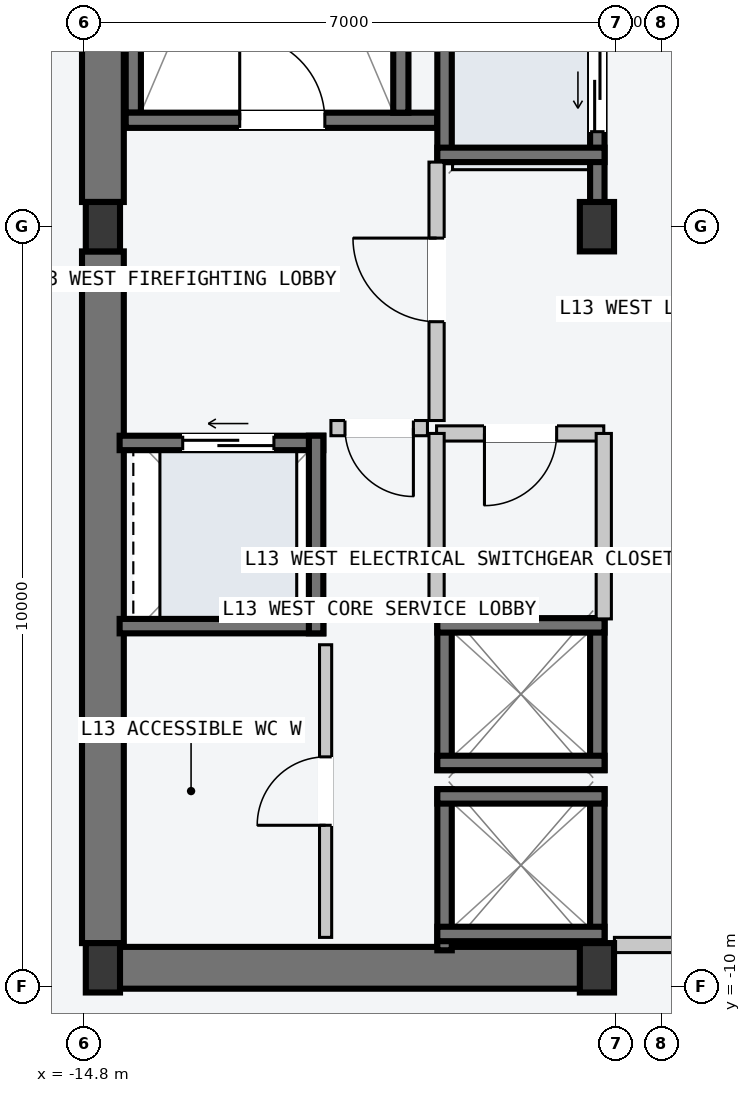
"""IFC4 building model, lengths in metres.
Left out: names, types, materials, properties, quantities, classifications, styles, units other than length and angle.
Written with IfcOpenShell. Run it as: python <this file> out.ifc"""

import sys

from ifc_helpers import new_model, si_unit, direction, frame, frame_2d, origin, origin_2d, place, context, subcontext, project, spatial, rectangle, i_section, extrude, element, fill, save


model = new_model("IFC4")
c1 = context("Model", 3, precision=1e-05, world=origin(), true_north=direction((0.0, 1.0)))
c2 = subcontext(c1, "Body", "Model", "MODEL_VIEW")
j1 = project(units=[si_unit("LENGTHUNIT", "METRE"), si_unit("PLANEANGLEUNIT", "RADIAN")], contexts=[c1])
p1 = place(None, origin())
s1 = spatial("IfcSite", under=j1, at=p1, CompositionType="ELEMENT")
p2 = place(p1, origin())
s2 = spatial("IfcBuilding", under=s1, at=p2, CompositionType="ELEMENT")
p3 = place(p2, frame((0.0, 0.0, 52.8)))
s3 = spatial("IfcBuildingStorey", under=s2, at=p3, CompositionType="ELEMENT", Elevation=52.8)
p4 = place(p3, frame((-14.53, -9.75, -0.2), z_axis=(0.0, 0.0, 1.0), x_axis=(1.0, 0.0, 0.0)))
e1 = element("IfcWall", 1, at=p4, inside=s3, PredefinedType="SHEAR", context=c2, shape_type="SweptSolid", body=[
    extrude(rectangle(XDim=6.46, YDim=0.55, at=frame_2d((3.23, 0.0))), origin(), (0.0, 0.0, 1.0), 3.6),
])
for number, where, z_axis, x_axis in (
    (2, (-14.55, -9.425, -0.2), (0.0, 0.0, 1.0), (0.0, 1.0, 0.0)),
    (3, (-14.55, 0.325, -0.2), (0.0, 0.0, 1.0), (0.0, 1.0, 0.0)),
):
    element("IfcWall", number, at=place(p3, frame(where, z_axis=z_axis, x_axis=x_axis)), inside=s3, PredefinedType="SHEAR", context=c2, shape_type="SweptSolid", body=[
        extrude(rectangle(XDim=9.1, YDim=0.55, at=frame_2d((4.55, 0.0))), origin(), (0.0, 0.0, 1.0), 3.6),
    ])
p5 = place(p3, frame((-14.15, 1.5, -0.2), z_axis=(0.0, 0.0, 1.0), x_axis=(0.0, 1.0, 0.0)))
e4 = element("IfcWall", 4, at=p5, inside=s3, PredefinedType="SOLIDWALL", context=c2, shape_type="SweptSolid", body=[
    extrude(rectangle(XDim=7.8, YDim=0.2, at=frame_2d((3.9, 0.0))), origin(), (0.0, 0.0, 1.0), 3.6),
])
p6 = place(p3, frame((-14.25, 1.4, -0.2), z_axis=(0.0, 0.0, 1.0), x_axis=(1.0, 0.0, 0.0)))
e5 = element("IfcWall", 5, at=p6, inside=s3, PredefinedType="SOLIDWALL", context=c2, shape_type="SweptSolid", body=[
    extrude(rectangle(XDim=4.1, YDim=0.2, at=frame_2d((2.05, 0.0))), origin(), (0.0, 0.0, 1.0), 3.6),
])
p7 = place(p6, frame((1.5, 0.0, 0.2)))
e6 = element("IfcOpeningElement", 6, at=p7, cuts=e5, PredefinedType="OPENING", context=c2, shape_type="SweptSolid", body=[
    extrude(rectangle(XDim=1.12, YDim=2.18, at=frame_2d((0.56, 1.09))), frame((0.0, 0.11, 0.0), z_axis=(0.0, -1.0, 0.0), x_axis=(1.0, 0.0, 0.0)), (0.0, 0.0, 1.0), 0.22),
])
p8 = place(p3, frame((-10.63, 1.5, -0.2), z_axis=(0.0, 0.0, 1.0), x_axis=(0.0, 1.0, 0.0)))
e7 = element("IfcWall", 7, at=p8, inside=s3, PredefinedType="SOLIDWALL", context=c2, shape_type="SweptSolid", body=[
    extrude(rectangle(XDim=7.8, YDim=0.2, at=frame_2d((3.9, 0.0))), origin(), (0.0, 0.0, 1.0), 3.6),
])
for number, where, z_axis, x_axis in (
    (8, (-14.55, -9.75, 0.0), (0.0, 0.0, 1.0), (1.0, 0.0, 0.0)),
    (9, (-14.55, 0.0, 0.0), (0.0, 0.0, 1.0), (1.0, 0.0, 0.0)),
    (10, (-8.05, -9.75, 0.0), (0.0, 0.0, 1.0), (1.0, 0.0, 0.0)),
    (11, (-8.05, 0.0, 0.0), (0.0, 0.0, 1.0), (1.0, 0.0, 0.0)),
):
    element("IfcColumn", number, at=place(p3, frame(where, z_axis=z_axis, x_axis=x_axis)), inside=s3, PredefinedType="COLUMN", context=c2, shape_type="SweptSolid", body=[
        extrude(i_section(OverallWidth=0.45, OverallDepth=0.65, WebThickness=0.025, FlangeThickness=0.04, at=origin_2d()), origin(), (0.0, 0.0, 1.0), 3.6),
    ])
p9 = place(p3, frame((-8.045, 0.21, -0.2), z_axis=(0.0, 0.0, 1.0), x_axis=(0.0, 1.0, 0.0)))
e12 = element("IfcWall", 12, at=p9, inside=s3, PredefinedType="SOLIDWALL", context=c2, shape_type="SweptSolid", body=[
    extrude(rectangle(XDim=2.54, YDim=0.19, at=frame_2d((1.27, 0.0))), origin(), (0.0, 0.0, 1.0), 3.6),
])
p10 = place(p9, frame((1.04, 0.0, 0.2)))
e13 = element("IfcOpeningElement", 13, at=p10, cuts=e12, PredefinedType="OPENING", context=c2, shape_type="SweptSolid", body=[
    extrude(rectangle(XDim=1.1, YDim=2.2, at=frame_2d((0.55, 1.1))), frame((0.0, 0.105, 0.0), z_axis=(0.0, -1.0, 0.0), x_axis=(1.0, 0.0, 0.0)), (0.0, 0.0, 1.0), 0.21),
])
p11 = place(p3, frame((-10.055, 0.85, -0.2), z_axis=(0.0, 0.0, 1.0), x_axis=(0.0, 1.0, 0.0)))
e14 = element("IfcWall", 14, at=p11, inside=s3, PredefinedType="SOLIDWALL", context=c2, shape_type="SweptSolid", body=[
    extrude(rectangle(XDim=1.9, YDim=0.19, at=frame_2d((0.95, 0.0))), origin(), (0.0, 0.0, 1.0), 3.6),
])
p12 = place(p3, frame((-10.15, 0.945, -0.2), z_axis=(0.0, 0.0, 1.0), x_axis=(1.0, 0.0, 0.0)))
e15 = element("IfcWall", 15, at=p12, inside=s3, PredefinedType="SOLIDWALL", context=c2, shape_type="SweptSolid", body=[
    extrude(rectangle(XDim=2.2, YDim=0.19, at=frame_2d((1.1, 0.0))), origin(), (0.0, 0.0, 1.0), 3.6),
])
for number, where, z_axis, x_axis in (
    (16, (-8.045, -9.52, -0.2), (0.0, 0.0, 1.0), (0.0, 1.0, 0.0)),
    (17, (-10.055, -9.52, -0.2), (0.0, 0.0, 1.0), (0.0, 1.0, 0.0)),
):
    element("IfcWall", number, at=place(p3, frame(where, z_axis=z_axis, x_axis=x_axis)), inside=s3, PredefinedType="SOLIDWALL", context=c2, shape_type="SweptSolid", body=[
        extrude(rectangle(XDim=2.12, YDim=0.19, at=frame_2d((1.06, 0.0))), origin(), (0.0, 0.0, 1.0), 3.6),
    ])
for number, where, z_axis, x_axis in (
    (18, (-10.15, -7.495, -0.2), (0.0, 0.0, 1.0), (1.0, 0.0, 0.0)),
    (19, (-10.15, -9.305, -0.2), (0.0, 0.0, 1.0), (1.0, 0.0, 0.0)),
):
    element("IfcWall", number, at=place(p3, frame(where, z_axis=z_axis, x_axis=x_axis)), inside=s3, PredefinedType="SOLIDWALL", context=c2, shape_type="SweptSolid", body=[
        extrude(rectangle(XDim=2.2, YDim=0.19, at=frame_2d((1.1, 0.0))), origin(), (0.0, 0.0, 1.0), 3.6),
    ])
for number, where, z_axis, x_axis in (
    (20, (-8.045, -7.15, -0.2), (0.0, 0.0, 1.0), (0.0, 1.0, 0.0)),
    (21, (-10.055, -7.15, -0.2), (0.0, 0.0, 1.0), (0.0, 1.0, 0.0)),
):
    element("IfcWall", number, at=place(p3, frame(where, z_axis=z_axis, x_axis=x_axis)), inside=s3, PredefinedType="SOLIDWALL", context=c2, shape_type="SweptSolid", body=[
        extrude(rectangle(XDim=2.0, YDim=0.19, at=frame_2d((1.0, 0.0))), origin(), (0.0, 0.0, 1.0), 3.6),
    ])
for number, where, z_axis, x_axis in (
    (22, (-10.15, -5.245, -0.2), (0.0, 0.0, 1.0), (1.0, 0.0, 0.0)),
    (23, (-10.15, -7.055, -0.2), (0.0, 0.0, 1.0), (1.0, 0.0, 0.0)),
):
    element("IfcWall", number, at=place(p3, frame(where, z_axis=z_axis, x_axis=x_axis)), inside=s3, PredefinedType="SOLIDWALL", context=c2, shape_type="SweptSolid", body=[
        extrude(rectangle(XDim=2.2, YDim=0.19, at=frame_2d((1.1, 0.0))), origin(), (0.0, 0.0, 1.0), 3.6),
    ])
p13 = place(p3, frame((-14.33, -2.845, -0.2), z_axis=(0.0, 0.0, 1.0), x_axis=(1.0, 0.0, 0.0)))
e24 = element("IfcWall", 24, at=p13, inside=s3, PredefinedType="SOLIDWALL", context=c2, shape_type="SweptSolid", body=[
    extrude(rectangle(XDim=2.68, YDim=0.19, at=frame_2d((1.34, 0.0))), origin(), (0.0, 0.0, 1.0), 3.6),
])
p14 = place(p13, frame((0.83, 0.0, 0.2)))
e25 = element("IfcOpeningElement", 25, at=p14, cuts=e24, PredefinedType="OPENING", context=c2, shape_type="SweptSolid", body=[
    extrude(rectangle(XDim=1.2, YDim=2.2, at=frame_2d((0.6, 1.1))), frame((0.0, 0.105, 0.0), z_axis=(0.0, -1.0, 0.0), x_axis=(1.0, 0.0, 0.0)), (0.0, 0.0, 1.0), 0.21),
])
p15 = place(p3, frame((-14.33, -5.255, -0.2), z_axis=(0.0, 0.0, 1.0), x_axis=(1.0, 0.0, 0.0)))
e26 = element("IfcWall", 26, at=p15, inside=s3, PredefinedType="SOLIDWALL", context=c2, shape_type="SweptSolid", body=[
    extrude(rectangle(XDim=2.68, YDim=0.19, at=frame_2d((1.34, 0.0))), origin(), (0.0, 0.0, 1.0), 3.6),
])
p16 = place(p3, frame((-11.745, -5.35, -0.2), z_axis=(0.0, 0.0, 1.0), x_axis=(0.0, 1.0, 0.0)))
e27 = element("IfcWall", 27, at=p16, inside=s3, PredefinedType="SOLIDWALL", context=c2, shape_type="SweptSolid", body=[
    extrude(rectangle(XDim=2.6, YDim=0.19, at=frame_2d((1.3, 0.0))), origin(), (0.0, 0.0, 1.0), 3.6),
])
p17 = place(p3, frame((-6.02, -9.45, 0.0), z_axis=(0.0, 0.0, 1.0), x_axis=(-1.0, 0.0, 0.0)))
e28 = element("IfcWall", 28, at=p17, inside=s3, PredefinedType="PARTITIONING", context=c2, shape_type="SweptSolid", body=[
    extrude(rectangle(XDim=1.8, YDim=0.2, at=frame_2d((0.9, 0.0))), origin(), (0.0, 0.0, 1.0), 3.4),
])
p18 = place(p3, frame((-10.16, -2.55, 0.0), z_axis=(0.0, 0.0, 1.0), x_axis=(0.0, 1.0, 0.0)))
e29 = element("IfcWall", 29, at=p18, inside=s3, PredefinedType="PARTITIONING", context=c2, shape_type="SweptSolid", body=[
    extrude(rectangle(XDim=3.4, YDim=0.2, at=frame_2d((1.7, 0.0))), origin(), (0.0, 0.0, 1.0), 3.4),
])
p19 = place(p18, frame((1.3, 0.0, 0.0)))
e30 = element("IfcOpeningElement", 30, at=p19, cuts=e29, PredefinedType="OPENING", context=c2, shape_type="SweptSolid", body=[
    extrude(rectangle(XDim=1.1, YDim=2.15, at=frame_2d((0.55, 1.075))), frame((0.0, 0.11, 0.0), z_axis=(0.0, -1.0, 0.0), x_axis=(1.0, 0.0, 0.0)), (0.0, 0.0, 1.0), 0.22),
])
p20 = place(p3, frame((-10.28, -2.65, 0.0), z_axis=(0.0, 0.0, 1.0), x_axis=(-1.0, 0.0, 0.0)))
e31 = element("IfcWall", 31, at=p20, inside=s3, PredefinedType="PARTITIONING", context=c2, shape_type="SweptSolid", body=[
    extrude(rectangle(XDim=1.27, YDim=0.2, at=frame_2d((0.635, 0.0))), origin(), (0.0, 0.0, 1.0), 3.4),
])
p21 = place(p20, frame((0.185, 0.0, 0.0)))
e32 = element("IfcOpeningElement", 32, at=p21, cuts=e31, PredefinedType="OPENING", context=c2, shape_type="SweptSolid", body=[
    extrude(rectangle(XDim=0.9, YDim=2.15, at=frame_2d((0.45, 1.075))), frame((0.0, 0.11, 0.0), z_axis=(0.0, -1.0, 0.0), x_axis=(1.0, 0.0, 0.0)), (0.0, 0.0, 1.0), 0.22),
])
p22 = place(p3, frame((-7.96, -2.72, 0.0), z_axis=(0.0, 0.0, 1.0), x_axis=(-1.0, 0.0, 0.0)))
e33 = element("IfcWall", 33, at=p22, inside=s3, PredefinedType="PARTITIONING", context=c2, shape_type="SweptSolid", body=[
    extrude(rectangle(XDim=2.2, YDim=0.2, at=frame_2d((1.1, 0.0))), origin(), (0.0, 0.0, 1.0), 3.4),
])
p23 = place(p22, frame((0.62, 0.0, 0.0)))
e34 = element("IfcOpeningElement", 34, at=p23, cuts=e33, PredefinedType="OPENING", context=c2, shape_type="SweptSolid", body=[
    extrude(rectangle(XDim=0.95, YDim=2.1, at=frame_2d((0.475, 1.05))), frame((0.0, 0.11, 0.0), z_axis=(0.0, -1.0, 0.0), x_axis=(1.0, 0.0, 0.0)), (0.0, 0.0, 1.0), 0.22),
])
for number, where, z_axis, x_axis in (
    (35, (-7.96, -5.16, 0.0), (0.0, 0.0, 1.0), (0.0, 1.0, 0.0)),
    (36, (-10.16, -5.16, 0.0), (0.0, 0.0, 1.0), (0.0, 1.0, 0.0)),
):
    element("IfcWall", number, at=place(p3, frame(where, z_axis=z_axis, x_axis=x_axis)), inside=s3, PredefinedType="PARTITIONING", context=c2, shape_type="SweptSolid", body=[
        extrude(rectangle(XDim=2.44, YDim=0.2, at=frame_2d((1.22, 0.0))), origin(), (0.0, 0.0, 1.0), 3.4),
    ])
p24 = place(p3, frame((-11.62, -9.35, 0.0), z_axis=(0.0, 0.0, 1.0), x_axis=(0.0, 1.0, 0.0)))
e37 = element("IfcWall", 37, at=p24, inside=s3, PredefinedType="PARTITIONING", context=c2, shape_type="SweptSolid", body=[
    extrude(rectangle(XDim=3.85, YDim=0.16, at=frame_2d((1.925, 0.0))), origin(), (0.0, 0.0, 1.0), 3.4),
])
p25 = place(p24, frame((1.475, 0.0, 0.0)))
e38 = element("IfcOpeningElement", 38, at=p25, cuts=e37, PredefinedType="OPENING", context=c2, shape_type="SweptSolid", body=[
    extrude(rectangle(XDim=0.9, YDim=2.15, at=frame_2d((0.45, 1.075))), frame((0.0, 0.09, 0.0), z_axis=(0.0, -1.0, 0.0), x_axis=(1.0, 0.0, 0.0)), (0.0, 0.0, 1.0), 0.18),
])
p26 = place(p7, origin())
e39 = element("IfcDoor", 39, at=p26, inside=s3, OperationType="SINGLE_SWING_LEFT", PredefinedType="DOOR", context=c2, shape_type="SweptSolid", body=[
    extrude(rectangle(XDim=1.12, YDim=2.18, at=frame_2d((0.56, 1.09))), frame((0.0, 0.025, 0.0), z_axis=(0.0, -1.0, 0.0), x_axis=(1.0, 0.0, 0.0)), (0.0, 0.0, 1.0), 0.05),
])
fill(e6, e39)
p27 = place(p10, origin())
e40 = element("IfcDoor", 40, at=p27, inside=s3, OperationType="SLIDING_TO_LEFT", PredefinedType="DOOR", context=c2, shape_type="SweptSolid", body=[
    extrude(rectangle(XDim=1.1, YDim=2.2, at=frame_2d((0.55, 1.1))), frame((0.0, 0.025, 0.0), z_axis=(0.0, -1.0, 0.0), x_axis=(1.0, 0.0, 0.0)), (0.0, 0.0, 1.0), 0.05),
])
fill(e13, e40)
p28 = place(p14, origin())
e41 = element("IfcDoor", 41, at=p28, inside=s3, OperationType="SLIDING_TO_LEFT", PredefinedType="DOOR", context=c2, shape_type="SweptSolid", body=[
    extrude(rectangle(XDim=1.2, YDim=2.2, at=frame_2d((0.6, 1.1))), frame((0.0, 0.025, 0.0), z_axis=(0.0, -1.0, 0.0), x_axis=(1.0, 0.0, 0.0)), (0.0, 0.0, 1.0), 0.05),
])
fill(e25, e41)
p29 = place(p19, origin())
e42 = element("IfcDoor", 42, at=p29, inside=s3, OperationType="SINGLE_SWING_RIGHT", PredefinedType="DOOR", context=c2, shape_type="SweptSolid", body=[
    extrude(rectangle(XDim=1.1, YDim=2.15, at=frame_2d((0.55, 1.075))), frame((0.0, 0.025, 0.0), z_axis=(0.0, -1.0, 0.0), x_axis=(1.0, 0.0, 0.0)), (0.0, 0.0, 1.0), 0.05),
])
fill(e30, e42)
p30 = place(p21, origin())
e43 = element("IfcDoor", 43, at=p30, inside=s3, OperationType="SINGLE_SWING_LEFT", PredefinedType="DOOR", context=c2, shape_type="SweptSolid", body=[
    extrude(rectangle(XDim=0.9, YDim=2.15, at=frame_2d((0.45, 1.075))), frame((0.0, 0.025, 0.0), z_axis=(0.0, -1.0, 0.0), x_axis=(1.0, 0.0, 0.0)), (0.0, 0.0, 1.0), 0.05),
])
fill(e32, e43)
p31 = place(p23, origin())
e44 = element("IfcDoor", 44, at=p31, inside=s3, OperationType="SINGLE_SWING_RIGHT", PredefinedType="DOOR", context=c2, shape_type="SweptSolid", body=[
    extrude(rectangle(XDim=0.95, YDim=2.1, at=frame_2d((0.475, 1.05))), frame((0.0, 0.025, 0.0), z_axis=(0.0, -1.0, 0.0), x_axis=(1.0, 0.0, 0.0)), (0.0, 0.0, 1.0), 0.05),
])
fill(e34, e44)
p32 = place(p25, origin())
e45 = element("IfcDoor", 45, at=p32, inside=s3, OperationType="SINGLE_SWING_LEFT", PredefinedType="DOOR", context=c2, shape_type="SweptSolid", body=[
    extrude(rectangle(XDim=0.9, YDim=2.15, at=frame_2d((0.45, 1.075))), frame((0.0, 0.025, 0.0), z_axis=(0.0, -1.0, 0.0), x_axis=(1.0, 0.0, 0.0)), (0.0, 0.0, 1.0), 0.05),
])
fill(e38, e45)
save(model, sys.argv[1])
